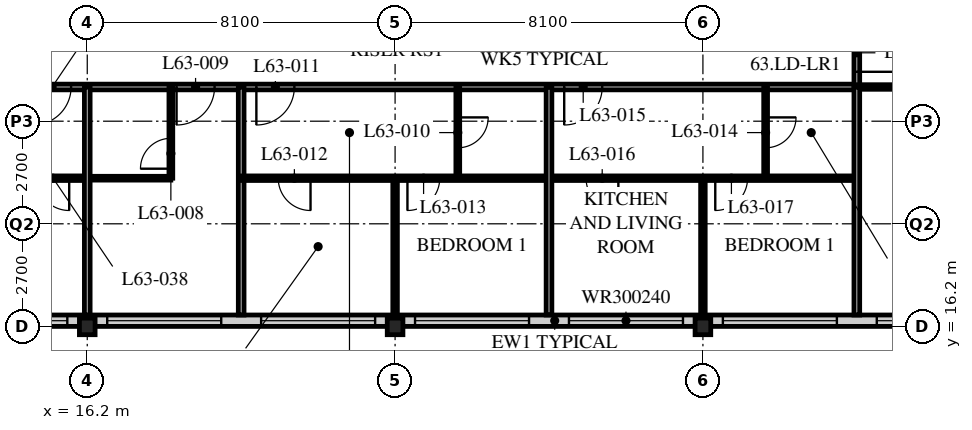
"""IFC4 building model, lengths in metres.
Left out: names, types, materials, properties, quantities, classifications, styles, units other than length and angle.
Written with IfcOpenShell. Run it as: python <this file> out.ifc"""

import sys

from ifc_helpers import new_model, si_unit, direction, frame, frame_2d, origin, origin_2d, place, context, subcontext, project, spatial, rectangle, i_section, extrude, element, fill, save


model = new_model("IFC4")
c1 = context("Model", 3, precision=1e-05, world=origin(), true_north=direction((0.0, 1.0)))
c2 = subcontext(c1, "Body", "Model", "MODEL_VIEW")
j1 = project(units=[si_unit("LENGTHUNIT", "METRE"), si_unit("PLANEANGLEUNIT", "RADIAN")], contexts=[c1])
p1 = place(None, origin())
s1 = spatial("IfcSite", under=j1, at=p1, CompositionType="ELEMENT")
p2 = place(p1, origin())
s2 = spatial("IfcBuilding", under=s1, at=p2, CompositionType="ELEMENT")
p3 = place(p2, frame((0.0, 0.0, 246.3)))
s3 = spatial("IfcBuildingStorey", under=s2, at=p3, CompositionType="ELEMENT", Elevation=246.3)
for number, where, z_axis, x_axis in (
    (1, (16.2, 16.2, 0.0), (0.0, 0.0, 1.0), (1.0, 0.0, 0.0)),
    (2, (24.3, 16.2, 0.0), (0.0, 0.0, 1.0), (1.0, 0.0, 0.0)),
    (3, (32.4, 16.2, 0.0), (0.0, 0.0, 1.0), (1.0, 0.0, 0.0)),
):
    element("IfcColumn", number, at=place(p3, frame(where, z_axis=z_axis, x_axis=x_axis)), inside=s3, PredefinedType="COLUMN", context=c2, shape_type="SweptSolid", body=[
        extrude(i_section(OverallWidth=0.412, OverallDepth=0.437, WebThickness=0.036, FlangeThickness=0.058, FilletRadius=0.015, at=origin_2d()), origin(), (0.0, 0.0, 1.0), 3.9),
    ])
p4 = place(p3, frame((8.4, 16.35, 0.0), z_axis=(0.0, 0.0, 1.0), x_axis=(1.0, 0.0, 0.0)))
e4 = element("IfcWall", 4, at=p4, inside=s3, PredefinedType="SOLIDWALL", context=c2, shape_type="SweptSolid", body=[
    extrude(rectangle(XDim=40.2, YDim=0.3, at=frame_2d((20.1, 0.0))), origin(), (0.0, 0.0, 1.0), 3.69),
])
p5 = place(p4, frame((0.225, 0.0, 0.6)))
e5 = element("IfcOpeningElement", 5, at=p5, cuts=e4, PredefinedType="OPENING", context=c2, shape_type="SweptSolid", body=[
    extrude(rectangle(XDim=3.0, YDim=2.4, at=frame_2d((1.5, 1.2))), frame((0.0, 0.16, 0.0), z_axis=(0.0, -1.0, 0.0), x_axis=(1.0, 0.0, 0.0)), (0.0, 0.0, 1.0), 0.32),
])
p6 = place(p4, frame((4.275, 0.0, 0.6)))
e6 = element("IfcOpeningElement", 6, at=p6, cuts=e4, PredefinedType="OPENING", context=c2, shape_type="SweptSolid", body=[
    extrude(rectangle(XDim=3.0, YDim=2.4, at=frame_2d((1.5, 1.2))), frame((0.0, 0.16, 0.0), z_axis=(0.0, -1.0, 0.0), x_axis=(1.0, 0.0, 0.0)), (0.0, 0.0, 1.0), 0.32),
])
p7 = place(p4, frame((8.325, 0.0, 0.6)))
e7 = element("IfcOpeningElement", 7, at=p7, cuts=e4, PredefinedType="OPENING", context=c2, shape_type="SweptSolid", body=[
    extrude(rectangle(XDim=3.0, YDim=2.4, at=frame_2d((1.5, 1.2))), frame((0.0, 0.16, 0.0), z_axis=(0.0, -1.0, 0.0), x_axis=(1.0, 0.0, 0.0)), (0.0, 0.0, 1.0), 0.32),
])
p8 = place(p4, frame((12.375, 0.0, 0.6)))
e8 = element("IfcOpeningElement", 8, at=p8, cuts=e4, PredefinedType="OPENING", context=c2, shape_type="SweptSolid", body=[
    extrude(rectangle(XDim=3.0, YDim=2.4, at=frame_2d((1.5, 1.2))), frame((0.0, 0.16, 0.0), z_axis=(0.0, -1.0, 0.0), x_axis=(1.0, 0.0, 0.0)), (0.0, 0.0, 1.0), 0.32),
])
p9 = place(p4, frame((16.425, 0.0, 0.6)))
e9 = element("IfcOpeningElement", 9, at=p9, cuts=e4, PredefinedType="OPENING", context=c2, shape_type="SweptSolid", body=[
    extrude(rectangle(XDim=3.0, YDim=2.4, at=frame_2d((1.5, 1.2))), frame((0.0, 0.16, 0.0), z_axis=(0.0, -1.0, 0.0), x_axis=(1.0, 0.0, 0.0)), (0.0, 0.0, 1.0), 0.32),
])
p10 = place(p4, frame((20.475, 0.0, 0.6)))
e10 = element("IfcOpeningElement", 10, at=p10, cuts=e4, PredefinedType="OPENING", context=c2, shape_type="SweptSolid", body=[
    extrude(rectangle(XDim=3.0, YDim=2.4, at=frame_2d((1.5, 1.2))), frame((0.0, 0.16, 0.0), z_axis=(0.0, -1.0, 0.0), x_axis=(1.0, 0.0, 0.0)), (0.0, 0.0, 1.0), 0.32),
])
p11 = place(p4, frame((24.525, 0.0, 0.6)))
e11 = element("IfcOpeningElement", 11, at=p11, cuts=e4, PredefinedType="OPENING", context=c2, shape_type="SweptSolid", body=[
    extrude(rectangle(XDim=3.0, YDim=2.4, at=frame_2d((1.5, 1.2))), frame((0.0, 0.16, 0.0), z_axis=(0.0, -1.0, 0.0), x_axis=(1.0, 0.0, 0.0)), (0.0, 0.0, 1.0), 0.32),
])
p12 = place(p4, frame((28.575, 0.0, 0.6)))
e12 = element("IfcOpeningElement", 12, at=p12, cuts=e4, PredefinedType="OPENING", context=c2, shape_type="SweptSolid", body=[
    extrude(rectangle(XDim=3.0, YDim=2.4, at=frame_2d((1.5, 1.2))), frame((0.0, 0.16, 0.0), z_axis=(0.0, -1.0, 0.0), x_axis=(1.0, 0.0, 0.0)), (0.0, 0.0, 1.0), 0.32),
])
p13 = place(p4, frame((32.625, 0.0, 0.6)))
e13 = element("IfcOpeningElement", 13, at=p13, cuts=e4, PredefinedType="OPENING", context=c2, shape_type="SweptSolid", body=[
    extrude(rectangle(XDim=3.0, YDim=2.4, at=frame_2d((1.5, 1.2))), frame((0.0, 0.16, 0.0), z_axis=(0.0, -1.0, 0.0), x_axis=(1.0, 0.0, 0.0)), (0.0, 0.0, 1.0), 0.32),
])
p14 = place(p4, frame((36.675, 0.0, 0.6)))
e14 = element("IfcOpeningElement", 14, at=p14, cuts=e4, PredefinedType="OPENING", context=c2, shape_type="SweptSolid", body=[
    extrude(rectangle(XDim=3.0, YDim=2.4, at=frame_2d((1.5, 1.2))), frame((0.0, 0.16, 0.0), z_axis=(0.0, -1.0, 0.0), x_axis=(1.0, 0.0, 0.0)), (0.0, 0.0, 1.0), 0.32),
])
p15 = place(p3, frame((12.15, 22.5, 0.0), z_axis=(0.0, 0.0, 1.0), x_axis=(1.0, 0.0, 0.0)))
e15 = element("IfcWall", 15, at=p15, inside=s3, PredefinedType="PARTITIONING", context=c2, shape_type="SweptSolid", body=[
    extrude(rectangle(XDim=24.3, YDim=0.15, at=frame_2d((12.15, 0.0))), origin(), (0.0, 0.0, 1.0), 3.69),
])
p16 = place(p15, frame((6.4, 0.0, 0.0)))
e16 = element("IfcOpeningElement", 16, at=p16, cuts=e15, PredefinedType="OPENING", context=c2, shape_type="SweptSolid", body=[
    extrude(rectangle(XDim=1.0, YDim=2.1, at=frame_2d((0.5, 1.05))), frame((0.0, 0.085, 0.0), z_axis=(0.0, -1.0, 0.0), x_axis=(1.0, 0.0, 0.0)), (0.0, 0.0, 1.0), 0.17),
])
p17 = place(p15, frame((8.5, 0.0, 0.0)))
e17 = element("IfcOpeningElement", 17, at=p17, cuts=e15, PredefinedType="OPENING", context=c2, shape_type="SweptSolid", body=[
    extrude(rectangle(XDim=1.0, YDim=2.1, at=frame_2d((0.5, 1.05))), frame((0.0, 0.085, 0.0), z_axis=(0.0, -1.0, 0.0), x_axis=(1.0, 0.0, 0.0)), (0.0, 0.0, 1.0), 0.17),
])
p18 = place(p15, frame((16.6, 0.0, 0.0)))
e18 = element("IfcOpeningElement", 18, at=p18, cuts=e15, PredefinedType="OPENING", context=c2, shape_type="SweptSolid", body=[
    extrude(rectangle(XDim=1.0, YDim=2.1, at=frame_2d((0.5, 1.05))), frame((0.0, 0.085, 0.0), z_axis=(0.0, -1.0, 0.0), x_axis=(1.0, 0.0, 0.0)), (0.0, 0.0, 1.0), 0.17),
])
p19 = place(p15, frame((2.625, 0.0, 0.0)))
e19 = element("IfcOpeningElement", 19, at=p19, cuts=e15, PredefinedType="OPENING", context=c2, shape_type="SweptSolid", body=[
    extrude(rectangle(XDim=1.0, YDim=2.1, at=frame_2d((0.5, 1.05))), frame((0.0, 0.085, 0.0), z_axis=(0.0, -1.0, 0.0), x_axis=(1.0, 0.0, 0.0)), (0.0, 0.0, 1.0), 0.17),
])
p20 = place(p3, frame((36.45, 22.5, 0.0), z_axis=(0.0, 0.0, 1.0), x_axis=(0.0, 1.0, 0.0)))
e20 = element("IfcWall", 20, at=p20, inside=s3, PredefinedType="PARTITIONING", context=c2, shape_type="SweptSolid", body=[
    extrude(rectangle(XDim=1.8, YDim=0.15, at=frame_2d((0.9, 0.0))), origin(), (0.0, 0.0, 1.0), 3.69),
])
p21 = place(p20, frame((0.4, 0.0, 0.0)))
e21 = element("IfcOpeningElement", 21, at=p21, cuts=e20, PredefinedType="OPENING", context=c2, shape_type="SweptSolid", body=[
    extrude(rectangle(XDim=1.0, YDim=2.1, at=frame_2d((0.5, 1.05))), frame((0.0, 0.085, 0.0), z_axis=(0.0, -1.0, 0.0), x_axis=(1.0, 0.0, 0.0)), (0.0, 0.0, 1.0), 0.17),
])
p22 = place(p3, frame((16.2, 20.1, 0.0), z_axis=(0.0, 0.0, 1.0), x_axis=(1.0, 0.0, 0.0)))
e22 = element("IfcWall", 22, at=p22, inside=s3, PredefinedType="PARTITIONING", context=c2, shape_type="SweptSolid", body=[
    extrude(rectangle(XDim=2.2, YDim=0.1, at=frame_2d((1.1, 0.0))), origin(), (0.0, 0.0, 1.0), 3.69),
])
p23 = place(p3, frame((18.4, 22.5, 0.0), z_axis=(0.0, 0.0, 1.0), x_axis=(0.0, -1.0, 0.0)))
e23 = element("IfcWall", 23, at=p23, inside=s3, PredefinedType="PARTITIONING", context=c2, shape_type="SweptSolid", body=[
    extrude(rectangle(XDim=2.4, YDim=0.1, at=frame_2d((1.2, 0.0))), origin(), (0.0, 0.0, 1.0), 3.69),
])
p24 = place(p23, frame((1.35, 0.0, 0.0)))
e24 = element("IfcOpeningElement", 24, at=p24, cuts=e23, PredefinedType="OPENING", context=c2, shape_type="SweptSolid", body=[
    extrude(rectangle(XDim=0.8, YDim=2.1, at=frame_2d((0.4, 1.05))), frame((0.0, 0.06, 0.0), z_axis=(0.0, -1.0, 0.0), x_axis=(1.0, 0.0, 0.0)), (0.0, 0.0, 1.0), 0.12),
])
p25 = place(p3, frame((20.25, 22.5, 0.0), z_axis=(0.0, 0.0, 1.0), x_axis=(0.0, -1.0, 0.0)))
e25 = element("IfcWall", 25, at=p25, inside=s3, PredefinedType="PARTITIONING", context=c2, shape_type="SweptSolid", body=[
    extrude(rectangle(XDim=6.0, YDim=0.15, at=frame_2d((3.0, 0.0))), origin(), (0.0, 0.0, 1.0), 3.69),
])
p26 = place(p3, frame((20.25, 20.1, 0.0), z_axis=(0.0, 0.0, 1.0), x_axis=(1.0, 0.0, 0.0)))
e26 = element("IfcWall", 26, at=p26, inside=s3, PredefinedType="PARTITIONING", context=c2, shape_type="SweptSolid", body=[
    extrude(rectangle(XDim=16.2, YDim=0.12, at=frame_2d((8.1, 0.0))), origin(), (0.0, 0.0, 1.0), 3.69),
])
p27 = place(p26, frame((0.975, 0.0, 0.0)))
e27 = element("IfcOpeningElement", 27, at=p27, cuts=e26, PredefinedType="OPENING", context=c2, shape_type="SweptSolid", body=[
    extrude(rectangle(XDim=0.85, YDim=2.1, at=frame_2d((0.425, 1.05))), frame((0.0, 0.07, 0.0), z_axis=(0.0, -1.0, 0.0), x_axis=(1.0, 0.0, 0.0)), (0.0, 0.0, 1.0), 0.14),
])
p28 = place(p26, frame((4.375, 0.0, 0.0)))
e28 = element("IfcOpeningElement", 28, at=p28, cuts=e26, PredefinedType="OPENING", context=c2, shape_type="SweptSolid", body=[
    extrude(rectangle(XDim=0.85, YDim=2.1, at=frame_2d((0.425, 1.05))), frame((0.0, 0.07, 0.0), z_axis=(0.0, -1.0, 0.0), x_axis=(1.0, 0.0, 0.0)), (0.0, 0.0, 1.0), 0.14),
])
p29 = place(p26, frame((9.075, 0.0, 0.0)))
e29 = element("IfcOpeningElement", 29, at=p29, cuts=e26, PredefinedType="OPENING", context=c2, shape_type="SweptSolid", body=[
    extrude(rectangle(XDim=0.85, YDim=2.1, at=frame_2d((0.425, 1.05))), frame((0.0, 0.07, 0.0), z_axis=(0.0, -1.0, 0.0), x_axis=(1.0, 0.0, 0.0)), (0.0, 0.0, 1.0), 0.14),
])
p30 = place(p26, frame((12.475, 0.0, 0.0)))
e30 = element("IfcOpeningElement", 30, at=p30, cuts=e26, PredefinedType="OPENING", context=c2, shape_type="SweptSolid", body=[
    extrude(rectangle(XDim=0.85, YDim=2.1, at=frame_2d((0.425, 1.05))), frame((0.0, 0.07, 0.0), z_axis=(0.0, -1.0, 0.0), x_axis=(1.0, 0.0, 0.0)), (0.0, 0.0, 1.0), 0.14),
])
p31 = place(p3, frame((25.95, 22.5, 0.0), z_axis=(0.0, 0.0, 1.0), x_axis=(0.0, -1.0, 0.0)))
e31 = element("IfcWall", 31, at=p31, inside=s3, PredefinedType="PARTITIONING", context=c2, shape_type="SweptSolid", body=[
    extrude(rectangle(XDim=2.4, YDim=0.1, at=frame_2d((1.2, 0.0))), origin(), (0.0, 0.0, 1.0), 3.69),
])
p32 = place(p31, frame((0.8, 0.0, 0.0)))
e32 = element("IfcOpeningElement", 32, at=p32, cuts=e31, PredefinedType="OPENING", context=c2, shape_type="SweptSolid", body=[
    extrude(rectangle(XDim=0.8, YDim=2.1, at=frame_2d((0.4, 1.05))), frame((0.0, 0.06, 0.0), z_axis=(0.0, -1.0, 0.0), x_axis=(1.0, 0.0, 0.0)), (0.0, 0.0, 1.0), 0.12),
])
p33 = place(p3, frame((24.3, 20.1, 0.0), z_axis=(0.0, 0.0, 1.0), x_axis=(0.0, -1.0, 0.0)))
e33 = element("IfcWall", 33, at=p33, inside=s3, PredefinedType="PARTITIONING", context=c2, shape_type="SweptSolid", body=[
    extrude(rectangle(XDim=3.6, YDim=0.12, at=frame_2d((1.8, 0.0))), origin(), (0.0, 0.0, 1.0), 3.078),
])
p34 = place(p3, frame((28.35, 22.5, 0.0), z_axis=(0.0, 0.0, 1.0), x_axis=(0.0, -1.0, 0.0)))
e34 = element("IfcWall", 34, at=p34, inside=s3, PredefinedType="PARTITIONING", context=c2, shape_type="SweptSolid", body=[
    extrude(rectangle(XDim=6.0, YDim=0.15, at=frame_2d((3.0, 0.0))), origin(), (0.0, 0.0, 1.0), 3.69),
])
p35 = place(p3, frame((34.05, 22.5, 0.0), z_axis=(0.0, 0.0, 1.0), x_axis=(0.0, -1.0, 0.0)))
e35 = element("IfcWall", 35, at=p35, inside=s3, PredefinedType="PARTITIONING", context=c2, shape_type="SweptSolid", body=[
    extrude(rectangle(XDim=2.4, YDim=0.1, at=frame_2d((1.2, 0.0))), origin(), (0.0, 0.0, 1.0), 3.69),
])
p36 = place(p35, frame((0.8, 0.0, 0.0)))
e36 = element("IfcOpeningElement", 36, at=p36, cuts=e35, PredefinedType="OPENING", context=c2, shape_type="SweptSolid", body=[
    extrude(rectangle(XDim=0.8, YDim=2.1, at=frame_2d((0.4, 1.05))), frame((0.0, 0.06, 0.0), z_axis=(0.0, -1.0, 0.0), x_axis=(1.0, 0.0, 0.0)), (0.0, 0.0, 1.0), 0.12),
])
p37 = place(p3, frame((32.4, 20.1, 0.0), z_axis=(0.0, 0.0, 1.0), x_axis=(0.0, -1.0, 0.0)))
e37 = element("IfcWall", 37, at=p37, inside=s3, PredefinedType="PARTITIONING", context=c2, shape_type="SweptSolid", body=[
    extrude(rectangle(XDim=3.6, YDim=0.12, at=frame_2d((1.8, 0.0))), origin(), (0.0, 0.0, 1.0), 3.078),
])
p38 = place(p3, frame((12.15, 20.1, 0.0), z_axis=(0.0, 0.0, 1.0), x_axis=(1.0, 0.0, 0.0)))
e38 = element("IfcWall", 38, at=p38, inside=s3, PredefinedType="PARTITIONING", context=c2, shape_type="SweptSolid", body=[
    extrude(rectangle(XDim=4.05, YDim=0.12, at=frame_2d((2.025, 0.0))), origin(), (0.0, 0.0, 1.0), 3.69),
])
p39 = place(p38, frame((2.725, 0.0, 0.0)))
e39 = element("IfcOpeningElement", 39, at=p39, cuts=e38, PredefinedType="OPENING", context=c2, shape_type="SweptSolid", body=[
    extrude(rectangle(XDim=0.85, YDim=2.1, at=frame_2d((0.425, 1.05))), frame((0.0, 0.07, 0.0), z_axis=(0.0, -1.0, 0.0), x_axis=(1.0, 0.0, 0.0)), (0.0, 0.0, 1.0), 0.14),
])
p40 = place(p3, frame((16.2, 22.5, 0.0), z_axis=(0.0, 0.0, 1.0), x_axis=(0.0, -1.0, 0.0)))
e40 = element("IfcWall", 40, at=p40, inside=s3, PredefinedType="PARTITIONING", context=c2, shape_type="SweptSolid", body=[
    extrude(rectangle(XDim=6.0, YDim=0.15, at=frame_2d((3.0, 0.0))), origin(), (0.0, 0.0, 1.0), 3.078),
])
p41 = place(p3, frame((36.45, 22.5, 0.0), z_axis=(0.0, 0.0, 1.0), x_axis=(1.0, 0.0, 0.0)))
e41 = element("IfcWall", 41, at=p41, inside=s3, PredefinedType="PARTITIONING", context=c2, shape_type="SweptSolid", body=[
    extrude(rectangle(XDim=6.45, YDim=0.12, at=frame_2d((3.225, 0.0))), origin(), (0.0, 0.0, 1.0), 3.69),
])
p42 = place(p41, frame((2.8, 0.0, 0.0)))
e42 = element("IfcOpeningElement", 42, at=p42, cuts=e41, PredefinedType="OPENING", context=c2, shape_type="SweptSolid", body=[
    extrude(rectangle(XDim=0.85, YDim=2.1, at=frame_2d((0.425, 1.05))), frame((0.0, 0.07, 0.0), z_axis=(0.0, -1.0, 0.0), x_axis=(1.0, 0.0, 0.0)), (0.0, 0.0, 1.0), 0.14),
])
p43 = place(p3, frame((36.45, 16.5, 0.0), z_axis=(0.0, 0.0, 1.0), x_axis=(0.0, 1.0, 0.0)))
e43 = element("IfcWall", 43, at=p43, inside=s3, PredefinedType="PARTITIONING", context=c2, shape_type="SweptSolid", body=[
    extrude(rectangle(XDim=6.0, YDim=0.15, at=frame_2d((3.0, 0.0))), origin(), (0.0, 0.0, 1.0), 3.69),
])
p44 = place(p6, origin())
e44 = element("IfcWindow", 44, at=p44, inside=s3, PartitioningType="SINGLE_PANEL", PredefinedType="WINDOW", context=c2, shape_type="SweptSolid", body=[
    extrude(rectangle(XDim=3.0, YDim=2.4, at=frame_2d((1.5, 1.2))), frame((0.0, 0.03, 0.0), z_axis=(0.0, -1.0, 0.0), x_axis=(1.0, 0.0, 0.0)), (0.0, 0.0, 1.0), 0.06),
])
fill(e6, e44)
p45 = place(p7, origin())
e45 = element("IfcWindow", 45, at=p45, inside=s3, PartitioningType="SINGLE_PANEL", PredefinedType="WINDOW", context=c2, shape_type="SweptSolid", body=[
    extrude(rectangle(XDim=3.0, YDim=2.4, at=frame_2d((1.5, 1.2))), frame((0.0, 0.03, 0.0), z_axis=(0.0, -1.0, 0.0), x_axis=(1.0, 0.0, 0.0)), (0.0, 0.0, 1.0), 0.06),
])
fill(e7, e45)
p46 = place(p8, origin())
e46 = element("IfcWindow", 46, at=p46, inside=s3, PartitioningType="SINGLE_PANEL", PredefinedType="WINDOW", context=c2, shape_type="SweptSolid", body=[
    extrude(rectangle(XDim=3.0, YDim=2.4, at=frame_2d((1.5, 1.2))), frame((0.0, 0.03, 0.0), z_axis=(0.0, -1.0, 0.0), x_axis=(1.0, 0.0, 0.0)), (0.0, 0.0, 1.0), 0.06),
])
fill(e8, e46)
p47 = place(p9, origin())
e47 = element("IfcWindow", 47, at=p47, inside=s3, PartitioningType="SINGLE_PANEL", PredefinedType="WINDOW", context=c2, shape_type="SweptSolid", body=[
    extrude(rectangle(XDim=3.0, YDim=2.4, at=frame_2d((1.5, 1.2))), frame((0.0, 0.03, 0.0), z_axis=(0.0, -1.0, 0.0), x_axis=(1.0, 0.0, 0.0)), (0.0, 0.0, 1.0), 0.06),
])
fill(e9, e47)
p48 = place(p10, origin())
e48 = element("IfcWindow", 48, at=p48, inside=s3, PartitioningType="SINGLE_PANEL", PredefinedType="WINDOW", context=c2, shape_type="SweptSolid", body=[
    extrude(rectangle(XDim=3.0, YDim=2.4, at=frame_2d((1.5, 1.2))), frame((0.0, 0.03, 0.0), z_axis=(0.0, -1.0, 0.0), x_axis=(1.0, 0.0, 0.0)), (0.0, 0.0, 1.0), 0.06),
])
fill(e10, e48)
p49 = place(p11, origin())
e49 = element("IfcWindow", 49, at=p49, inside=s3, PartitioningType="SINGLE_PANEL", PredefinedType="WINDOW", context=c2, shape_type="SweptSolid", body=[
    extrude(rectangle(XDim=3.0, YDim=2.4, at=frame_2d((1.5, 1.2))), frame((0.0, 0.03, 0.0), z_axis=(0.0, -1.0, 0.0), x_axis=(1.0, 0.0, 0.0)), (0.0, 0.0, 1.0), 0.06),
])
fill(e11, e49)
p50 = place(p12, origin())
e50 = element("IfcWindow", 50, at=p50, inside=s3, PartitioningType="SINGLE_PANEL", PredefinedType="WINDOW", context=c2, shape_type="SweptSolid", body=[
    extrude(rectangle(XDim=3.0, YDim=2.4, at=frame_2d((1.5, 1.2))), frame((0.0, 0.03, 0.0), z_axis=(0.0, -1.0, 0.0), x_axis=(1.0, 0.0, 0.0)), (0.0, 0.0, 1.0), 0.06),
])
fill(e12, e50)
p51 = place(p24, origin())
e51 = element("IfcDoor", 51, at=p51, inside=s3, OperationType="SINGLE_SWING_LEFT", PredefinedType="DOOR", context=c2, shape_type="SweptSolid", body=[
    extrude(rectangle(XDim=0.8, YDim=2.1, at=frame_2d((0.4, 1.05))), frame((0.0, 0.025, 0.0), z_axis=(0.0, -1.0, 0.0), x_axis=(1.0, 0.0, 0.0)), (0.0, 0.0, 1.0), 0.05),
])
fill(e24, e51)
p52 = place(p16, origin())
e52 = element("IfcDoor", 52, at=p52, inside=s3, OperationType="SINGLE_SWING_RIGHT", PredefinedType="DOOR", context=c2, shape_type="SweptSolid", body=[
    extrude(rectangle(XDim=1.0, YDim=2.1, at=frame_2d((0.5, 1.05))), frame((0.0, 0.025, 0.0), z_axis=(0.0, -1.0, 0.0), x_axis=(1.0, 0.0, 0.0)), (0.0, 0.0, 1.0), 0.05),
])
fill(e16, e52)
p53 = place(p32, origin())
e53 = element("IfcDoor", 53, at=p53, inside=s3, OperationType="SINGLE_SWING_LEFT", PredefinedType="DOOR", context=c2, shape_type="SweptSolid", body=[
    extrude(rectangle(XDim=0.8, YDim=2.1, at=frame_2d((0.4, 1.05))), frame((0.0, 0.025, 0.0), z_axis=(0.0, -1.0, 0.0), x_axis=(1.0, 0.0, 0.0)), (0.0, 0.0, 1.0), 0.05),
])
fill(e32, e53)
p54 = place(p17, origin())
e54 = element("IfcDoor", 54, at=p54, inside=s3, OperationType="SINGLE_SWING_RIGHT", PredefinedType="DOOR", context=c2, shape_type="SweptSolid", body=[
    extrude(rectangle(XDim=1.0, YDim=2.1, at=frame_2d((0.5, 1.05))), frame((0.0, 0.025, 0.0), z_axis=(0.0, -1.0, 0.0), x_axis=(1.0, 0.0, 0.0)), (0.0, 0.0, 1.0), 0.05),
])
fill(e17, e54)
p55 = place(p27, origin())
e55 = element("IfcDoor", 55, at=p55, inside=s3, OperationType="SINGLE_SWING_LEFT", PredefinedType="DOOR", context=c2, shape_type="SweptSolid", body=[
    extrude(rectangle(XDim=0.85, YDim=2.1, at=frame_2d((0.425, 1.05))), frame((0.0, 0.025, 0.0), z_axis=(0.0, -1.0, 0.0), x_axis=(1.0, 0.0, 0.0)), (0.0, 0.0, 1.0), 0.05),
])
fill(e27, e55)
p56 = place(p28, origin())
e56 = element("IfcDoor", 56, at=p56, inside=s3, OperationType="SINGLE_SWING_RIGHT", PredefinedType="DOOR", context=c2, shape_type="SweptSolid", body=[
    extrude(rectangle(XDim=0.85, YDim=2.1, at=frame_2d((0.425, 1.05))), frame((0.0, 0.025, 0.0), z_axis=(0.0, -1.0, 0.0), x_axis=(1.0, 0.0, 0.0)), (0.0, 0.0, 1.0), 0.05),
])
fill(e28, e56)
p57 = place(p36, origin())
e57 = element("IfcDoor", 57, at=p57, inside=s3, OperationType="SINGLE_SWING_LEFT", PredefinedType="DOOR", context=c2, shape_type="SweptSolid", body=[
    extrude(rectangle(XDim=0.8, YDim=2.1, at=frame_2d((0.4, 1.05))), frame((0.0, 0.025, 0.0), z_axis=(0.0, -1.0, 0.0), x_axis=(1.0, 0.0, 0.0)), (0.0, 0.0, 1.0), 0.05),
])
fill(e36, e57)
p58 = place(p18, origin())
e58 = element("IfcDoor", 58, at=p58, inside=s3, OperationType="SINGLE_SWING_RIGHT", PredefinedType="DOOR", context=c2, shape_type="SweptSolid", body=[
    extrude(rectangle(XDim=1.0, YDim=2.1, at=frame_2d((0.5, 1.05))), frame((0.0, 0.025, 0.0), z_axis=(0.0, -1.0, 0.0), x_axis=(1.0, 0.0, 0.0)), (0.0, 0.0, 1.0), 0.05),
])
fill(e18, e58)
p59 = place(p29, origin())
e59 = element("IfcDoor", 59, at=p59, inside=s3, OperationType="SINGLE_SWING_LEFT", PredefinedType="DOOR", context=c2, shape_type="SweptSolid", body=[
    extrude(rectangle(XDim=0.85, YDim=2.1, at=frame_2d((0.425, 1.05))), frame((0.0, 0.025, 0.0), z_axis=(0.0, -1.0, 0.0), x_axis=(1.0, 0.0, 0.0)), (0.0, 0.0, 1.0), 0.05),
])
fill(e29, e59)
p60 = place(p30, origin())
e60 = element("IfcDoor", 60, at=p60, inside=s3, OperationType="SINGLE_SWING_RIGHT", PredefinedType="DOOR", context=c2, shape_type="SweptSolid", body=[
    extrude(rectangle(XDim=0.85, YDim=2.1, at=frame_2d((0.425, 1.05))), frame((0.0, 0.025, 0.0), z_axis=(0.0, -1.0, 0.0), x_axis=(1.0, 0.0, 0.0)), (0.0, 0.0, 1.0), 0.05),
])
fill(e30, e60)
p61 = place(p19, origin())
e61 = element("IfcDoor", 61, at=p61, inside=s3, OperationType="SINGLE_SWING_RIGHT", PredefinedType="DOOR", context=c2, shape_type="SweptSolid", body=[
    extrude(rectangle(XDim=1.0, YDim=2.1, at=frame_2d((0.5, 1.05))), frame((0.0, 0.025, 0.0), z_axis=(0.0, -1.0, 0.0), x_axis=(1.0, 0.0, 0.0)), (0.0, 0.0, 1.0), 0.05),
])
fill(e19, e61)
p62 = place(p39, origin())
e62 = element("IfcDoor", 62, at=p62, inside=s3, OperationType="SINGLE_SWING_LEFT", PredefinedType="DOOR", context=c2, shape_type="SweptSolid", body=[
    extrude(rectangle(XDim=0.85, YDim=2.1, at=frame_2d((0.425, 1.05))), frame((0.0, 0.025, 0.0), z_axis=(0.0, -1.0, 0.0), x_axis=(1.0, 0.0, 0.0)), (0.0, 0.0, 1.0), 0.05),
])
fill(e39, e62)
p63 = place(p21, origin())
e63 = element("IfcDoor", 63, at=p63, inside=s3, OperationType="SINGLE_SWING_RIGHT", PredefinedType="DOOR", context=c2, shape_type="SweptSolid", body=[
    extrude(rectangle(XDim=1.0, YDim=2.1, at=frame_2d((0.5, 1.05))), frame((0.0, 0.025, 0.0), z_axis=(0.0, -1.0, 0.0), x_axis=(1.0, 0.0, 0.0)), (0.0, 0.0, 1.0), 0.05),
])
fill(e21, e63)
save(model, sys.argv[1])
